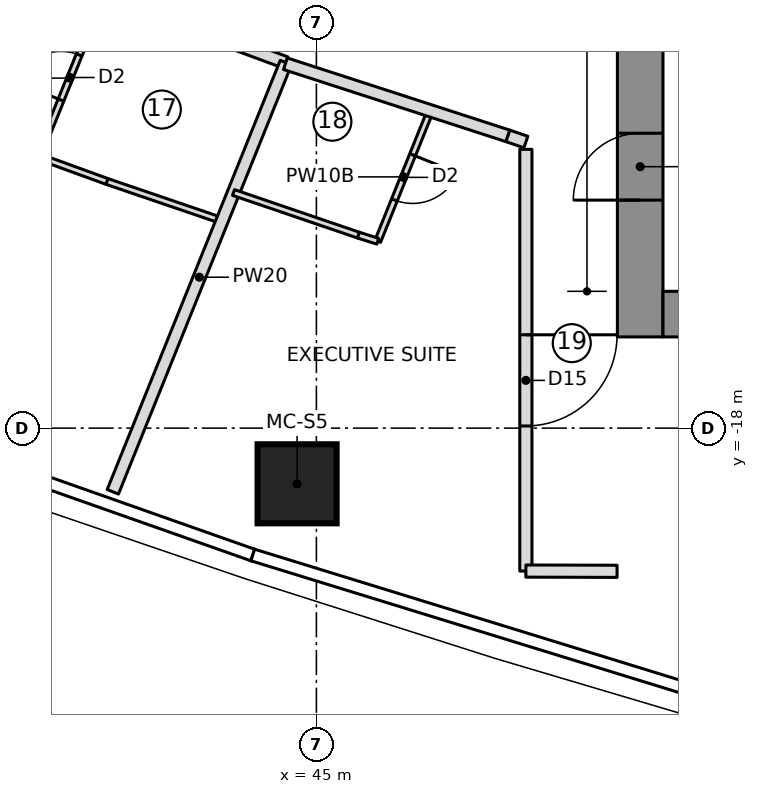
"""IFC4 building model, lengths in metres.
Left out: names, types, materials, properties, quantities, classifications, styles, units other than length and angle.
Written with IfcOpenShell. Run it as: python <this file> out.ifc"""

import sys

from ifc_helpers import new_model, si_unit, direction, frame, frame_2d, origin, origin_2d, place, context, subcontext, project, spatial, rectangle, extrude, element, fill, save


model = new_model("IFC4")
c1 = context("Model", 3, precision=1e-05, world=origin(), true_north=direction((0.0, 1.0)))
c2 = subcontext(c1, "Body", "Model", "MODEL_VIEW")
j1 = project(units=[si_unit("LENGTHUNIT", "METRE"), si_unit("PLANEANGLEUNIT", "RADIAN")], contexts=[c1])
p1 = place(None, origin())
s1 = spatial("IfcSite", under=j1, at=p1, CompositionType="ELEMENT")
p2 = place(p1, origin())
s2 = spatial("IfcBuilding", under=s1, at=p2, CompositionType="ELEMENT")
p3 = place(p2, frame((0.0, 0.0, 182.6)))
s3 = spatial("IfcBuildingStorey", under=s2, at=p3, CompositionType="ELEMENT", Elevation=182.6)
p4 = place(p3, frame((50.325, -16.5, 0.0), z_axis=(0.0, 0.0, 1.0), x_axis=(0.0, 1.0, 0.0)))
e1 = element("IfcWall", 1, at=p4, inside=s3, PredefinedType="SHEAR", context=c2, shape_type="SweptSolid", body=[
    extrude(rectangle(XDim=9.85, YDim=0.75, at=frame_2d((4.925, 0.0))), origin(), (0.0, 0.0, 1.0), 3.55),
])
p5 = place(p4, frame((2.25, 0.0, 0.0)))
e2 = element("IfcOpeningElement", 2, at=p5, cuts=e1, PredefinedType="OPENING", context=c2, shape_type="SweptSolid", body=[
    extrude(rectangle(XDim=1.1, YDim=2.1, at=frame_2d((0.55, 1.05))), frame((0.0, 0.385, 0.0), z_axis=(0.0, -1.0, 0.0), x_axis=(1.0, 0.0, 0.0)), (0.0, 0.0, 1.0), 0.77),
])
p6 = place(p3, frame((50.7, -16.125, 0.0), z_axis=(0.0, 0.0, 1.0), x_axis=(1.0, 0.0, 0.0)))
e3 = element("IfcWall", 3, at=p6, inside=s3, PredefinedType="SHEAR", context=c2, shape_type="SweptSolid", body=[
    extrude(rectangle(XDim=13.77, YDim=0.75, at=frame_2d((6.885, 0.0))), origin(), (0.0, 0.0, 1.0), 3.55),
])
p7 = place(p3, frame((44.683, -18.916, 0.0), z_axis=(0.0, 0.0, 1.0), x_axis=(1.0, 0.0, 0.0)))
e4 = element("IfcColumn", 4, at=p7, inside=s3, PredefinedType="COLUMN", context=c2, shape_type="SweptSolid", body=[
    extrude(rectangle(XDim=1.3, YDim=1.3, at=origin_2d()), origin(), (0.0, 0.0, 1.0), 3.55),
])
p8 = place(p3, frame((33.801, -8.032, 0.0), z_axis=(0.0, 0.0, 1.0), x_axis=(0.937916242759, -0.346861819127, 0.0)))
e5 = element("IfcWall", 5, at=p8, inside=s3, PredefinedType="PARTITIONING", context=c2, shape_type="SweptSolid", body=[
    extrude(rectangle(XDim=11.405, YDim=0.2, at=frame_2d((5.702, 0.0))), origin(), (0.0, 0.0, 1.0), 3.25),
])
p9 = place(p8, frame((1.15, 0.0, 0.0)))
e6 = element("IfcOpeningElement", 6, at=p9, cuts=e5, PredefinedType="OPENING", context=c2, shape_type="SweptSolid", body=[
    extrude(rectangle(XDim=1.0, YDim=2.1, at=frame_2d((0.5, 1.05))), frame((0.0, 0.11, 0.0), z_axis=(0.0, -1.0, 0.0), x_axis=(1.0, 0.0, 0.0)), (0.0, 0.0, 1.0), 0.22),
])
p10 = place(p3, frame((40.426, -13.532, 0.0), z_axis=(0.0, 0.0, 1.0), x_axis=(0.373889095325, 0.927473419779, 0.0)))
e7 = element("IfcWall", 7, at=p10, inside=s3, PredefinedType="PARTITIONING", context=c2, shape_type="SweptSolid", body=[
    extrude(rectangle(XDim=2.778, YDim=0.1, at=frame_2d((1.389, 0.0))), origin(), (0.0, 0.0, 1.0), 3.25),
])
p11 = place(p10, frame((1.0, 0.0, 0.0)))
e8 = element("IfcOpeningElement", 8, at=p11, cuts=e7, PredefinedType="OPENING", context=c2, shape_type="SweptSolid", body=[
    extrude(rectangle(XDim=0.8, YDim=2.1, at=frame_2d((0.4, 1.05))), frame((0.0, 0.06, 0.0), z_axis=(0.0, -1.0, 0.0), x_axis=(1.0, 0.0, 0.0)), (0.0, 0.0, 1.0), 0.12),
])
p12 = place(p3, frame((43.449, -14.589, 0.0), z_axis=(0.0, 0.0, 1.0), x_axis=(-0.94641533286, 0.322952036265, 0.0)))
e9 = element("IfcWall", 9, at=p12, inside=s3, PredefinedType="PARTITIONING", context=c2, shape_type="SweptSolid", body=[
    extrude(rectangle(XDim=2.002, YDim=0.1, at=frame_2d((1.001, 0.0))), origin(), (0.0, 0.0, 1.0), 3.25),
])
p13 = place(p3, frame((41.555, -13.943, 0.0), z_axis=(0.0, 0.0, 1.0), x_axis=(-0.939781557461, 0.341775692897, 0.0)))
e10 = element("IfcWall", 10, at=p13, inside=s3, PredefinedType="PARTITIONING", context=c2, shape_type="SweptSolid", body=[
    extrude(rectangle(XDim=1.201, YDim=0.1, at=frame_2d((0.601, 0.0))), origin(), (0.0, 0.0, 1.0), 3.25),
])
p14 = place(p3, frame((41.652, -19.048, 0.0), z_axis=(0.0, 0.0, 1.0), x_axis=(0.373877998371, 0.927477893178, 0.0)))
e11 = element("IfcWall", 11, at=p14, inside=s3, PredefinedType="PARTITIONING", context=c2, shape_type="SweptSolid", body=[
    extrude(rectangle(XDim=7.611, YDim=0.2, at=frame_2d((3.806, 0.0))), origin(), (0.0, 0.0, 1.0), 3.25),
])
p15 = place(p3, frame((46.863, -12.809, 0.0), z_axis=(0.0, 0.0, 1.0), x_axis=(-0.373877855241, -0.927477950876, 0.0)))
e12 = element("IfcWall", 12, at=p15, inside=s3, PredefinedType="PARTITIONING", context=c2, shape_type="SweptSolid", body=[
    extrude(rectangle(XDim=2.283, YDim=0.1, at=frame_2d((1.142, 0.0))), origin(), (0.0, 0.0, 1.0), 3.25),
])
p16 = place(p15, frame((0.75, 0.0, 0.0)))
e13 = element("IfcOpeningElement", 13, at=p16, cuts=e12, PredefinedType="OPENING", context=c2, shape_type="SweptSolid", body=[
    extrude(rectangle(XDim=0.8, YDim=2.1, at=frame_2d((0.4, 1.05))), frame((0.0, 0.06, 0.0), z_axis=(0.0, -1.0, 0.0), x_axis=(1.0, 0.0, 0.0)), (0.0, 0.0, 1.0), 0.12),
])
p17 = place(p3, frame((46.009, -14.927, 0.0), z_axis=(0.0, 0.0, 1.0), x_axis=(-0.952618746207, 0.304166935045, 0.0)))
e14 = element("IfcWall", 14, at=p17, inside=s3, PredefinedType="PARTITIONING", context=c2, shape_type="SweptSolid", body=[
    extrude(rectangle(XDim=0.335, YDim=0.1, at=frame_2d((0.167, 0.0))), origin(), (0.0, 0.0, 1.0), 3.25),
])
p18 = place(p3, frame((45.69, -14.825, 0.0), z_axis=(0.0, 0.0, 1.0), x_axis=(-0.946442988685, 0.322870979136, 0.0)))
e15 = element("IfcWall", 15, at=p18, inside=s3, PredefinedType="PARTITIONING", context=c2, shape_type="SweptSolid", body=[
    extrude(rectangle(XDim=2.169, YDim=0.1, at=frame_2d((1.085, 0.0))), origin(), (0.0, 0.0, 1.0), 3.25),
])
p19 = place(p3, frame((44.49, -12.007, 0.0), z_axis=(0.0, 0.0, 1.0), x_axis=(0.951228355446, -0.308487626648, 0.0)))
e16 = element("IfcWall", 16, at=p19, inside=s3, PredefinedType="PARTITIONING", context=c2, shape_type="SweptSolid", body=[
    extrude(rectangle(XDim=3.847, YDim=0.2, at=frame_2d((1.924, 0.0))), origin(), (0.0, 0.0, 1.0), 3.25),
])
p20 = place(p3, frame((48.15, -13.194, 0.0), z_axis=(0.0, 0.0, 1.0), x_axis=(0.946069343286, -0.323964191994, 0.0)))
e17 = element("IfcWall", 17, at=p20, inside=s3, PredefinedType="PARTITIONING", context=c2, shape_type="SweptSolid", body=[
    extrude(rectangle(XDim=0.312, YDim=0.2, at=frame_2d((0.156, 0.0))), origin(), (0.0, 0.0, 1.0), 3.25),
])
p21 = place(p3, frame((48.445, -13.415, 0.0), z_axis=(0.0, 0.0, 1.0), x_axis=(0.0, -1.0, 0.0)))
e18 = element("IfcWall", 18, at=p21, inside=s3, PredefinedType="PARTITIONING", context=c2, shape_type="SweptSolid", body=[
    extrude(rectangle(XDim=6.936, YDim=0.2, at=frame_2d((3.468, 0.0))), origin(), (0.0, 0.0, 1.0), 3.25),
])
p22 = place(p21, frame((3.05, 0.0, 0.0)))
e19 = element("IfcOpeningElement", 19, at=p22, cuts=e18, PredefinedType="OPENING", context=c2, shape_type="SweptSolid", body=[
    extrude(rectangle(XDim=1.5, YDim=2.1, at=frame_2d((0.75, 1.05))), frame((0.0, 0.11, 0.0), z_axis=(0.0, -1.0, 0.0), x_axis=(1.0, 0.0, 0.0)), (0.0, 0.0, 1.0), 0.22),
])
p23 = place(p3, frame((48.445, -20.351, 0.0), z_axis=(0.0, 0.0, 1.0), x_axis=(0.999996609175, -0.002604157836, 0.0)))
e20 = element("IfcWall", 20, at=p23, inside=s3, PredefinedType="PARTITIONING", context=c2, shape_type="SweptSolid", body=[
    extrude(rectangle(XDim=1.5, YDim=0.2, at=frame_2d((0.75, 0.0))), origin(), (0.0, 0.0, 1.0), 3.25),
])
p24 = place(p11, origin())
e21 = element("IfcDoor", 21, at=p24, inside=s3, OperationType="SINGLE_SWING_LEFT", PredefinedType="DOOR", context=c2, shape_type="SweptSolid", body=[
    extrude(rectangle(XDim=0.8, YDim=2.1, at=frame_2d((0.4, 1.05))), frame((0.0, 0.025, 0.0), z_axis=(0.0, -1.0, 0.0), x_axis=(1.0, 0.0, 0.0)), (0.0, 0.0, 1.0), 0.05),
])
fill(e8, e21)
p25 = place(p16, origin())
e22 = element("IfcDoor", 22, at=p25, inside=s3, OperationType="SINGLE_SWING_LEFT", PredefinedType="DOOR", context=c2, shape_type="SweptSolid", body=[
    extrude(rectangle(XDim=0.8, YDim=2.1, at=frame_2d((0.4, 1.05))), frame((0.0, 0.025, 0.0), z_axis=(0.0, -1.0, 0.0), x_axis=(1.0, 0.0, 0.0)), (0.0, 0.0, 1.0), 0.05),
])
fill(e13, e22)
p26 = place(p22, origin())
e23 = element("IfcDoor", 23, at=p26, inside=s3, OperationType="DOUBLE_DOOR_SINGLE_SWING", PredefinedType="DOOR", context=c2, shape_type="SweptSolid", body=[
    extrude(rectangle(XDim=1.5, YDim=2.1, at=frame_2d((0.75, 1.05))), frame((0.0, 0.025, 0.0), z_axis=(0.0, -1.0, 0.0), x_axis=(1.0, 0.0, 0.0)), (0.0, 0.0, 1.0), 0.05),
])
fill(e19, e23)
p27 = place(p5, origin())
e24 = element("IfcDoor", 24, at=p27, inside=s3, OperationType="SINGLE_SWING_RIGHT", PredefinedType="DOOR", context=c2, shape_type="SweptSolid", body=[
    extrude(rectangle(XDim=1.1, YDim=2.1, at=frame_2d((0.55, 1.05))), frame((0.0, 0.025, 0.0), z_axis=(0.0, -1.0, 0.0), x_axis=(1.0, 0.0, 0.0)), (0.0, 0.0, 1.0), 0.05),
])
fill(e2, e24)
save(model, sys.argv[1])
